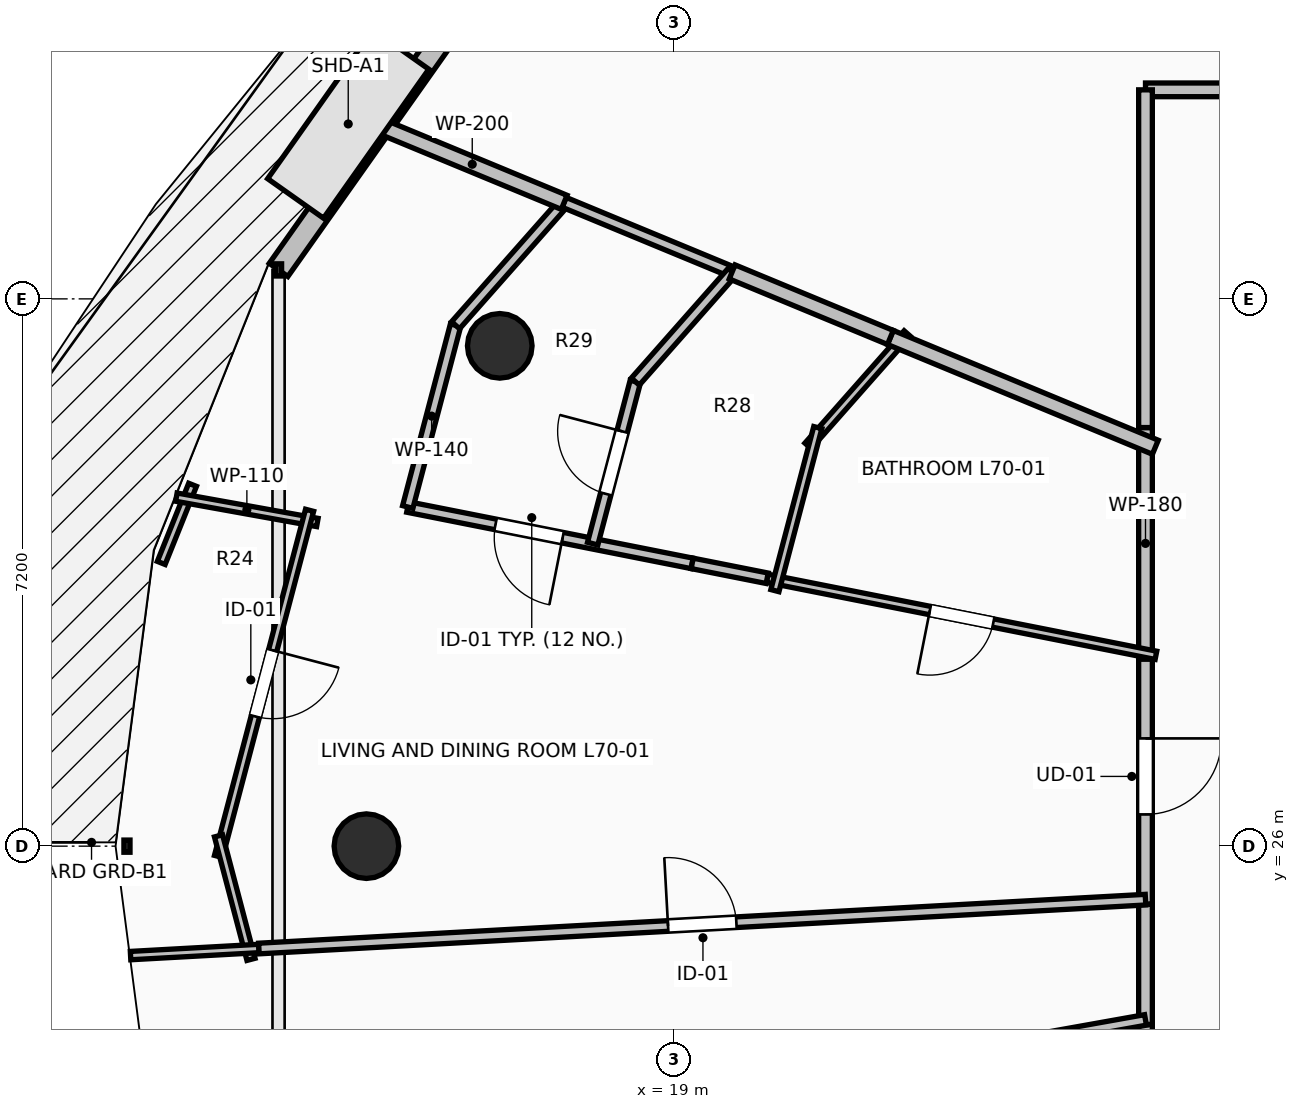
"""IFC4 building model, lengths in metres.
Left out: names, types, materials, properties, quantities, classifications, styles, units other than length and angle.
Written with IfcOpenShell. Run it as: python <this file> out.ifc"""

import sys

from ifc_helpers import new_model, si_unit, direction, frame, frame_2d, origin, origin_2d, place, context, subcontext, project, spatial, rectangle, circle, extrude, element, fill, save


model = new_model("IFC4")
c1 = context("Model", 3, precision=1e-05, world=origin(), true_north=direction((0.0, 1.0)))
c2 = subcontext(c1, "Body", "Model", "MODEL_VIEW")
j1 = project(units=[si_unit("LENGTHUNIT", "METRE"), si_unit("PLANEANGLEUNIT", "RADIAN")], contexts=[c1])
p1 = place(None, origin())
s1 = spatial("IfcSite", under=j1, at=p1, CompositionType="ELEMENT")
p2 = place(p1, origin())
s2 = spatial("IfcBuilding", under=s1, at=p2, CompositionType="ELEMENT")
p3 = place(p2, frame((0.0, 0.0, 259.1)))
s3 = spatial("IfcBuildingStorey", under=s2, at=p3, CompositionType="ELEMENT", Elevation=259.1)
for number, where, z_axis, x_axis in (
    (1, (16.705, 32.582, 0.0), (0.0, 0.0, 1.0), (-0.924, 0.383, 0.0)),
    (2, (14.95, 26.0, 0.0), (0.0, 0.0, 1.0), (-1.0, 0.0, 0.0)),
):
    element("IfcColumn", number, at=place(p3, frame(where, z_axis=z_axis, x_axis=x_axis)), inside=s3, PredefinedType="COLUMN", context=c2, shape_type="SweptSolid", body=[
        extrude(circle(Radius=0.425, at=origin_2d()), origin(), (0.0, 0.0, 1.0), 3.55),
    ])
p4 = place(p3, frame((16.216, 37.006, 0.0), z_axis=(0.0, 0.0, 1.0), x_axis=(-0.577261247247, -0.816559521668, 0.0)))
e3 = element("IfcWall", 3, at=p4, inside=s3, PredefinedType="STANDARD", context=c2, shape_type="SweptSolid", body=[
    extrude(rectangle(XDim=4.194, YDim=0.3, at=frame_2d((2.097, 0.0))), origin(), (0.0, 0.0, 1.0), 3.29),
])
p5 = place(p3, frame((25.2, 28.599, 0.0), z_axis=(0.0, 0.0, 1.0), x_axis=(0.0, -1.0, 0.0)))
e4 = element("IfcWall", 4, at=p5, inside=s3, PredefinedType="PARTITIONING", context=c2, shape_type="SweptSolid", body=[
    extrude(rectangle(XDim=3.363, YDim=0.18, at=frame_2d((1.682, 0.0))), origin(), (0.0, 0.0, 1.0), 2.482),
])
p6 = place(p5, frame((1.181, 0.0, 0.0)))
e5 = element("IfcOpeningElement", 5, at=p6, cuts=e4, PredefinedType="OPENING", context=c2, shape_type="SweptSolid", body=[
    extrude(rectangle(XDim=1.0, YDim=2.15, at=frame_2d((0.5, 1.075))), frame((0.0, 0.105, 0.0), z_axis=(0.0, -1.0, 0.0), x_axis=(1.0, 0.0, 0.0)), (0.0, 0.0, 1.0), 0.21),
])
p7 = place(p3, frame((25.2, 31.507, 0.0), z_axis=(0.0, 0.0, 1.0), x_axis=(0.0, -1.0, 0.0)))
e6 = element("IfcWall", 6, at=p7, inside=s3, PredefinedType="PARTITIONING", context=c2, shape_type="SweptSolid", body=[
    extrude(rectangle(XDim=3.048, YDim=0.18, at=frame_2d((1.524, 0.0))), origin(), (0.0, 0.0, 1.0), 2.482),
])
p8 = place(p3, frame((25.2, 25.236, 0.0), z_axis=(0.0, 0.0, 1.0), x_axis=(0.0, -1.0, 0.0)))
e7 = element("IfcWall", 7, at=p8, inside=s3, PredefinedType="PARTITIONING", context=c2, shape_type="SweptSolid", body=[
    extrude(rectangle(XDim=1.583, YDim=0.18, at=frame_2d((0.792, 0.0))), origin(), (0.0, 0.0, 1.0), 3.29),
])
p9 = place(p3, frame((25.2, 23.653, 0.0), z_axis=(0.0, 0.0, 1.0), x_axis=(0.0, -1.0, 0.0)))
e8 = element("IfcWall", 8, at=p9, inside=s3, PredefinedType="PARTITIONING", context=c2, shape_type="SweptSolid", body=[
    extrude(rectangle(XDim=1.654, YDim=0.18, at=frame_2d((0.827, 0.0))), origin(), (0.0, 0.0, 1.0), 3.29),
])
p10 = place(p9, frame((0.402, 0.0, 0.0)))
e9 = element("IfcOpeningElement", 9, at=p10, cuts=e8, PredefinedType="OPENING", context=c2, shape_type="SweptSolid", body=[
    extrude(rectangle(XDim=0.85, YDim=2.1, at=frame_2d((0.425, 1.05))), frame((0.0, 0.105, 0.0), z_axis=(0.0, -1.0, 0.0), x_axis=(1.0, 0.0, 0.0)), (0.0, 0.0, 1.0), 0.21),
])
p11 = place(p3, frame((33.814, 35.95, 0.0), z_axis=(0.0, 0.0, 1.0), x_axis=(-1.0, 0.0, 0.0)))
e10 = element("IfcWall", 10, at=p11, inside=s3, PredefinedType="PARTITIONING", context=c2, shape_type="SweptSolid", body=[
    extrude(rectangle(XDim=8.614, YDim=0.18, at=frame_2d((4.307, 0.0))), origin(), (0.0, 0.0, 1.0), 2.482),
])
p12 = place(p11, frame((3.807, 0.0, 0.0)))
e11 = element("IfcOpeningElement", 11, at=p12, cuts=e10, PredefinedType="OPENING", context=c2, shape_type="SweptSolid", body=[
    extrude(rectangle(XDim=1.0, YDim=2.15, at=frame_2d((0.5, 1.075))), frame((0.0, 0.105, 0.0), z_axis=(0.0, -1.0, 0.0), x_axis=(1.0, 0.0, 0.0)), (0.0, 0.0, 1.0), 0.21),
])
p13 = place(p3, frame((25.2, 35.95, 0.0), z_axis=(0.0, 0.0, 1.0), x_axis=(0.0, -1.0, 0.0)))
e12 = element("IfcWall", 12, at=p13, inside=s3, PredefinedType="PARTITIONING", context=c2, shape_type="SweptSolid", body=[
    extrude(rectangle(XDim=4.443, YDim=0.18, at=frame_2d((2.221, 0.0))), origin(), (0.0, 0.0, 1.0), 2.482),
])
p14 = place(p3, frame((19.236, 29.72, 0.0), z_axis=(0.0, 0.0, 1.0), x_axis=(-0.980906665774, 0.194479081243, 0.0)))
e13 = element("IfcWall", 13, at=p14, inside=s3, PredefinedType="PARTITIONING", context=c2, shape_type="SweptSolid", body=[
    extrude(rectangle(XDim=3.815, YDim=0.14, at=frame_2d((1.907, 0.0))), origin(), (0.0, 0.0, 1.0), 2.874),
])
p15 = place(p14, frame((1.737, 0.0, 0.0)))
e14 = element("IfcOpeningElement", 14, at=p15, cuts=e13, PredefinedType="OPENING", context=c2, shape_type="SweptSolid", body=[
    extrude(rectangle(XDim=0.9, YDim=2.1, at=frame_2d((0.45, 1.05))), frame((0.0, 0.085, 0.0), z_axis=(0.0, -1.0, 0.0), x_axis=(1.0, 0.0, 0.0)), (0.0, 0.0, 1.0), 0.17),
])
p16 = place(p3, frame((15.494, 30.462, 0.0), z_axis=(0.0, 0.0, 1.0), x_axis=(0.254459276467, 0.967083489995, 0.0)))
e15 = element("IfcWall", 15, at=p16, inside=s3, PredefinedType="PARTITIONING", context=c2, shape_type="SweptSolid", body=[
    extrude(rectangle(XDim=2.472, YDim=0.14, at=frame_2d((1.236, 0.0))), origin(), (0.0, 0.0, 1.0), 3.29),
])
p17 = place(p3, frame((16.123, 32.853, 0.0), z_axis=(0.0, 0.0, 1.0), x_axis=(0.662205183315, 0.749322557508, 0.0)))
e16 = element("IfcWall", 16, at=p17, inside=s3, PredefinedType="PARTITIONING", context=c2, shape_type="SweptSolid", body=[
    extrude(rectangle(XDim=2.158, YDim=0.14, at=frame_2d((1.079, 0.0))), origin(), (0.0, 0.0, 1.0), 3.29),
])
p18 = place(p3, frame((17.552, 34.47, 0.0), z_axis=(0.0, 0.0, 1.0), x_axis=(0.923932252837, -0.382556129434, 0.0)))
e17 = element("IfcWall", 17, at=p18, inside=s3, PredefinedType="PARTITIONING", context=c2, shape_type="SweptSolid", body=[
    extrude(rectangle(XDim=2.392, YDim=0.14, at=frame_2d((1.196, 0.0))), origin(), (0.0, 0.0, 1.0), 2.874),
])
p19 = place(p3, frame((25.337, 28.511, 0.0), z_axis=(0.0, 0.0, 1.0), x_axis=(-0.980930272027, 0.194359978959, 0.0)))
e18 = element("IfcWall", 18, at=p19, inside=s3, PredefinedType="PARTITIONING", context=c2, shape_type="SweptSolid", body=[
    extrude(rectangle(XDim=5.214, YDim=0.11, at=frame_2d((2.607, 0.0))), origin(), (0.0, 0.0, 1.0), 2.936),
])
p20 = place(p19, frame((2.182, 0.0, 0.0)))
e19 = element("IfcOpeningElement", 19, at=p20, cuts=e18, PredefinedType="OPENING", context=c2, shape_type="SweptSolid", body=[
    extrude(rectangle(XDim=0.85, YDim=2.1, at=frame_2d((0.425, 1.05))), frame((0.0, 0.07, 0.0), z_axis=(0.0, -1.0, 0.0), x_axis=(1.0, 0.0, 0.0)), (0.0, 0.0, 1.0), 0.14),
])
p21 = place(p3, frame((12.663, 30.754, 0.0), z_axis=(0.0, 0.0, 1.0), x_axis=(-0.372150787983, -0.928172285195, 0.0)))
e20 = element("IfcWall", 20, at=p21, inside=s3, PredefinedType="PARTITIONING", context=c2, shape_type="SweptSolid", body=[
    extrude(rectangle(XDim=1.107, YDim=0.11, at=frame_2d((0.554, 0.0))), origin(), (0.0, 0.0, 1.0), 3.29),
])
p22 = place(p3, frame((12.45, 30.592, 0.0), z_axis=(0.0, 0.0, 1.0), x_axis=(0.984212226867, -0.176992351488, 0.0)))
e21 = element("IfcWall", 21, at=p22, inside=s3, PredefinedType="PARTITIONING", context=c2, shape_type="SweptSolid", body=[
    extrude(rectangle(XDim=1.884, YDim=0.11, at=frame_2d((0.942, 0.0))), origin(), (0.0, 0.0, 1.0), 3.29),
])
p23 = place(p3, frame((14.203, 30.418, 0.0), z_axis=(0.0, 0.0, 1.0), x_axis=(-0.254460123068, -0.967083267236, 0.0)))
e22 = element("IfcWall", 22, at=p23, inside=s3, PredefinedType="PARTITIONING", context=c2, shape_type="SweptSolid", body=[
    extrude(rectangle(XDim=4.709, YDim=0.11, at=frame_2d((2.354, 0.0))), origin(), (0.0, 0.0, 1.0), 3.29),
])
p24 = place(p23, frame((1.904, 0.0, 0.0)))
e23 = element("IfcOpeningElement", 23, at=p24, cuts=e22, PredefinedType="OPENING", context=c2, shape_type="SweptSolid", body=[
    extrude(rectangle(XDim=0.9, YDim=2.1, at=frame_2d((0.45, 1.05))), frame((0.0, 0.07, 0.0), z_axis=(0.0, -1.0, 0.0), x_axis=(1.0, 0.0, 0.0)), (0.0, 0.0, 1.0), 0.14),
])
p25 = place(p3, frame((13.004, 26.135, 0.0), z_axis=(0.0, 0.0, 1.0), x_axis=(0.254278727694, -0.967130978018, 0.0)))
e24 = element("IfcWall", 24, at=p25, inside=s3, PredefinedType="PARTITIONING", context=c2, shape_type="SweptSolid", body=[
    extrude(rectangle(XDim=1.68, YDim=0.11, at=frame_2d((0.84, 0.0))), origin(), (0.0, 0.0, 1.0), 3.29),
])
p26 = place(p3, frame((13.536, 24.654, 0.0), z_axis=(0.0, 0.0, 1.0), x_axis=(-0.998470551828, -0.055286138695, 0.0)))
e25 = element("IfcWall", 25, at=p26, inside=s3, PredefinedType="PARTITIONING", context=c2, shape_type="SweptSolid", body=[
    extrude(rectangle(XDim=1.691, YDim=0.11, at=frame_2d((0.846, 0.0))), origin(), (0.0, 0.0, 1.0), 3.29),
])
p27 = place(p3, frame((20.223, 29.524, 0.0), z_axis=(0.0, 0.0, 1.0), x_axis=(-0.98086901598, 0.194668881667, 0.0)))
e26 = element("IfcWall", 26, at=p27, inside=s3, PredefinedType="PARTITIONING", context=c2, shape_type="SweptSolid", body=[
    extrude(rectangle(XDim=1.006, YDim=0.14, at=frame_2d((0.503, 0.0))), origin(), (0.0, 0.0, 1.0), 3.022),
])
p28 = place(p3, frame((13.536, 24.653, 0.0), z_axis=(0.0, 0.0, 1.0), x_axis=(0.998485968097, 0.055007013313, 0.0)))
e27 = element("IfcWall", 27, at=p28, inside=s3, PredefinedType="PARTITIONING", context=c2, shape_type="SweptSolid", body=[
    extrude(rectangle(XDim=11.682, YDim=0.14, at=frame_2d((5.841, 0.0))), origin(), (0.0, 0.0, 1.0), 2.874),
])
p29 = place(p28, frame((5.391, 0.0, 0.0)))
e28 = element("IfcOpeningElement", 28, at=p29, cuts=e27, PredefinedType="OPENING", context=c2, shape_type="SweptSolid", body=[
    extrude(rectangle(XDim=0.9, YDim=2.1, at=frame_2d((0.45, 1.05))), frame((0.0, 0.085, 0.0), z_axis=(0.0, -1.0, 0.0), x_axis=(1.0, 0.0, 0.0)), (0.0, 0.0, 1.0), 0.17),
])
p30 = place(p3, frame((17.552, 34.47, 0.0), z_axis=(0.0, 0.0, 1.0), x_axis=(-0.9239134198, 0.382601610965, 0.0)))
e29 = element("IfcWall", 29, at=p30, inside=s3, PredefinedType="PARTITIONING", context=c2, shape_type="SweptSolid", body=[
    extrude(rectangle(XDim=2.618, YDim=0.2, at=frame_2d((1.309, 0.0))), origin(), (0.0, 0.0, 1.0), 3.29),
])
p31 = place(p3, frame((17.927, 29.98, 0.0), z_axis=(0.0, 0.0, 1.0), x_axis=(0.254476946675, 0.967078840432, 0.0)))
e30 = element("IfcWall", 30, at=p31, inside=s3, PredefinedType="PARTITIONING", context=c2, shape_type="SweptSolid", body=[
    extrude(rectangle(XDim=2.205, YDim=0.14, at=frame_2d((1.102, 0.0))), origin(), (0.0, 0.0, 1.0), 2.482),
])
p32 = place(p31, frame((0.677, 0.0, 0.0)))
e31 = element("IfcOpeningElement", 31, at=p32, cuts=e30, PredefinedType="OPENING", context=c2, shape_type="SweptSolid", body=[
    extrude(rectangle(XDim=0.85, YDim=2.1, at=frame_2d((0.425, 1.05))), frame((0.0, 0.085, 0.0), z_axis=(0.0, -1.0, 0.0), x_axis=(1.0, 0.0, 0.0)), (0.0, 0.0, 1.0), 0.17),
])
p33 = place(p3, frame((18.488, 32.112, 0.0), z_axis=(0.0, 0.0, 1.0), x_axis=(0.661856531983, 0.749630529709, 0.0)))
e32 = element("IfcWall", 32, at=p33, inside=s3, PredefinedType="PARTITIONING", context=c2, shape_type="SweptSolid", body=[
    extrude(rectangle(XDim=1.925, YDim=0.14, at=frame_2d((0.962, 0.0))), origin(), (0.0, 0.0, 1.0), 2.482),
])
p34 = place(p3, frame((22.066, 32.744, 0.0), z_axis=(0.0, 0.0, 1.0), x_axis=(-0.662047420969, -0.749461948593, 0.0)))
e33 = element("IfcWall", 33, at=p34, inside=s3, PredefinedType="PARTITIONING", context=c2, shape_type="SweptSolid", body=[
    extrude(rectangle(XDim=1.972, YDim=0.11, at=frame_2d((0.986, 0.0))), origin(), (0.0, 0.0, 1.0), 3.29),
])
p35 = place(p3, frame((20.889, 31.506, 0.0), z_axis=(0.0, 0.0, 1.0), x_axis=(-0.254406599134, -0.967097348935, 0.0)))
e34 = element("IfcWall", 34, at=p35, inside=s3, PredefinedType="PARTITIONING", context=c2, shape_type="SweptSolid", body=[
    extrude(rectangle(XDim=2.218, YDim=0.11, at=frame_2d((1.109, 0.0))), origin(), (0.0, 0.0, 1.0), 2.482),
])
p36 = place(p3, frame((25.329, 31.248, 0.0), z_axis=(0.0, 0.0, 1.0), x_axis=(-0.923827524065, 0.382808967736, 0.0)))
e35 = element("IfcWall", 35, at=p36, inside=s3, PredefinedType="PARTITIONING", context=c2, shape_type="SweptSolid", body=[
    extrude(rectangle(XDim=3.773, YDim=0.2, at=frame_2d((1.886, 0.0))), origin(), (0.0, 0.0, 1.0), 2.936),
])
p37 = place(p3, frame((21.844, 32.693, 0.0), z_axis=(0.0, 0.0, 1.0), x_axis=(-0.92387949598, 0.382683520559, 0.0)))
e36 = element("IfcWall", 36, at=p37, inside=s3, PredefinedType="PARTITIONING", context=c2, shape_type="SweptSolid", body=[
    extrude(rectangle(XDim=2.253, YDim=0.2, at=frame_2d((1.127, 0.0))), origin(), (0.0, 0.0, 1.0), 3.022),
])
p38 = place(p3, frame((12.577, 21.46, 0.0), z_axis=(0.0, 0.0, 1.0), x_axis=(0.984427104809, 0.175793274383, 0.0)))
e37 = element("IfcWall", 37, at=p38, inside=s3, PredefinedType="PARTITIONING", context=c2, shape_type="SweptSolid", body=[
    extrude(rectangle(XDim=12.823, YDim=0.14, at=frame_2d((6.411, 0.0))), origin(), (0.0, 0.0, 1.0), 2.874),
])
p39 = place(p6, origin())
e38 = element("IfcDoor", 38, at=p39, inside=s3, OperationType="SINGLE_SWING_LEFT", PredefinedType="DOOR", context=c2, shape_type="SweptSolid", body=[
    extrude(rectangle(XDim=1.0, YDim=2.15, at=frame_2d((0.5, 1.075))), frame((0.0, 0.025, 0.0), z_axis=(0.0, -1.0, 0.0), x_axis=(1.0, 0.0, 0.0)), (0.0, 0.0, 1.0), 0.05),
])
fill(e5, e38)
p40 = place(p15, origin())
e39 = element("IfcDoor", 39, at=p40, inside=s3, OperationType="SINGLE_SWING_LEFT", PredefinedType="DOOR", context=c2, shape_type="SweptSolid", body=[
    extrude(rectangle(XDim=0.9, YDim=2.1, at=frame_2d((0.45, 1.05))), frame((0.0, 0.025, 0.0), z_axis=(0.0, -1.0, 0.0), x_axis=(1.0, 0.0, 0.0)), (0.0, 0.0, 1.0), 0.05),
])
fill(e14, e39)
p41 = place(p20, origin())
e40 = element("IfcDoor", 40, at=p41, inside=s3, OperationType="SINGLE_SWING_RIGHT", PredefinedType="DOOR", context=c2, shape_type="SweptSolid", body=[
    extrude(rectangle(XDim=0.85, YDim=2.1, at=frame_2d((0.425, 1.05))), frame((0.0, 0.025, 0.0), z_axis=(0.0, -1.0, 0.0), x_axis=(1.0, 0.0, 0.0)), (0.0, 0.0, 1.0), 0.05),
])
fill(e19, e40)
p42 = place(p24, origin())
e41 = element("IfcDoor", 41, at=p42, inside=s3, OperationType="SINGLE_SWING_LEFT", PredefinedType="DOOR", context=c2, shape_type="SweptSolid", body=[
    extrude(rectangle(XDim=0.9, YDim=2.1, at=frame_2d((0.45, 1.05))), frame((0.0, 0.025, 0.0), z_axis=(0.0, -1.0, 0.0), x_axis=(1.0, 0.0, 0.0)), (0.0, 0.0, 1.0), 0.05),
])
fill(e23, e41)
p43 = place(p29, origin())
e42 = element("IfcDoor", 42, at=p43, inside=s3, OperationType="SINGLE_SWING_LEFT", PredefinedType="DOOR", context=c2, shape_type="SweptSolid", body=[
    extrude(rectangle(XDim=0.9, YDim=2.1, at=frame_2d((0.45, 1.05))), frame((0.0, 0.025, 0.0), z_axis=(0.0, -1.0, 0.0), x_axis=(1.0, 0.0, 0.0)), (0.0, 0.0, 1.0), 0.05),
])
fill(e28, e42)
p44 = place(p32, origin())
e43 = element("IfcDoor", 43, at=p44, inside=s3, OperationType="SINGLE_SWING_RIGHT", PredefinedType="DOOR", context=c2, shape_type="SweptSolid", body=[
    extrude(rectangle(XDim=0.85, YDim=2.1, at=frame_2d((0.425, 1.05))), frame((0.0, 0.025, 0.0), z_axis=(0.0, -1.0, 0.0), x_axis=(1.0, 0.0, 0.0)), (0.0, 0.0, 1.0), 0.05),
])
fill(e31, e43)
save(model, sys.argv[1])
